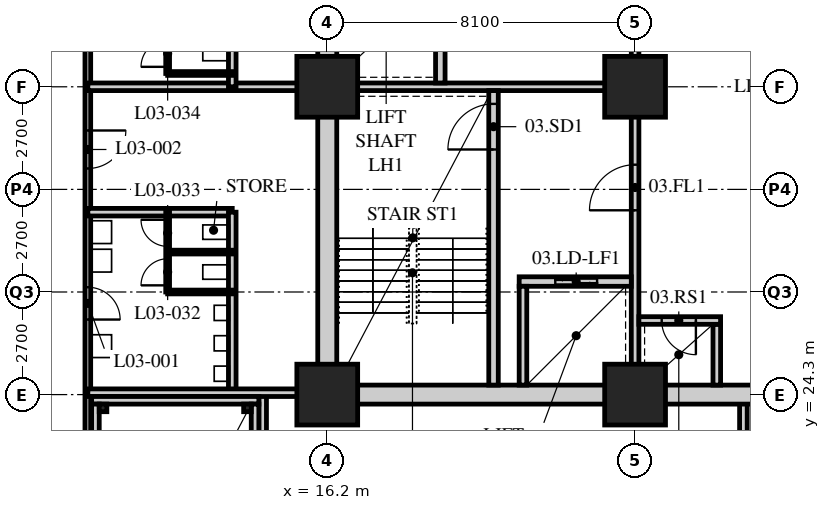
"""IFC4 building model, lengths in metres.
Left out: names, types, materials, properties, quantities, classifications, styles, units other than length and angle.
Written with IfcOpenShell. Run it as: python <this file> out.ifc"""

import sys

from ifc_helpers import new_model, si_unit, direction, frame, frame_2d, origin, origin_2d, place, context, subcontext, project, spatial, rectangle, hollow_rectangle, extrude, element, fill, save


model = new_model("IFC4")
c1 = context("Model", 3, precision=1e-05, world=origin(), true_north=direction((0.0, 1.0)))
c2 = subcontext(c1, "Body", "Model", "MODEL_VIEW")
j1 = project(units=[si_unit("LENGTHUNIT", "METRE"), si_unit("PLANEANGLEUNIT", "RADIAN")], contexts=[c1])
p1 = place(None, origin())
s1 = spatial("IfcSite", under=j1, at=p1, CompositionType="ELEMENT")
p2 = place(p1, origin())
s2 = spatial("IfcBuilding", under=s1, at=p2, CompositionType="ELEMENT")
p3 = place(p2, frame((0.0, 0.0, 16.8)))
s3 = spatial("IfcBuildingStorey", under=s2, at=p3, CompositionType="ELEMENT", Elevation=16.8)
for number, where, z_axis, x_axis in (
    (1, (16.2, 24.3, 0.0), (0.0, 0.0, 1.0), (1.0, 0.0, 0.0)),
    (2, (16.2, 32.4, 0.0), (0.0, 0.0, 1.0), (1.0, 0.0, 0.0)),
    (3, (24.3, 24.3, 0.0), (0.0, 0.0, 1.0), (1.0, 0.0, 0.0)),
    (4, (24.3, 32.4, 0.0), (0.0, 0.0, 1.0), (1.0, 0.0, 0.0)),
):
    element("IfcColumn", number, at=place(p3, frame(where, z_axis=z_axis, x_axis=x_axis)), inside=s3, PredefinedType="COLUMN", context=c2, shape_type="SweptSolid", body=[
        extrude(hollow_rectangle(XDim=1.6, YDim=1.6, WallThickness=0.15, at=origin_2d()), origin(), (0.0, 0.0, 1.0), 5.4),
    ])
p4 = place(p3, frame((9.9, 40.65, 0.0), z_axis=(0.0, 0.0, 1.0), x_axis=(0.0, -1.0, 0.0)))
e5 = element("IfcWall", 5, at=p4, inside=s3, PredefinedType="PARTITIONING", context=c2, shape_type="SweptSolid", body=[
    extrude(rectangle(XDim=30.75, YDim=0.15, at=frame_2d((15.375, 0.0))), origin(), (0.0, 0.0, 1.0), 5.15),
])
p5 = place(p4, frame((13.525, 0.0, 0.0)))
e6 = element("IfcOpeningElement", 6, at=p5, cuts=e5, PredefinedType="OPENING", context=c2, shape_type="SweptSolid", body=[
    extrude(rectangle(XDim=0.85, YDim=2.1, at=frame_2d((0.425, 1.05))), frame((0.0, 0.085, 0.0), z_axis=(0.0, -1.0, 0.0), x_axis=(1.0, 0.0, 0.0)), (0.0, 0.0, 1.0), 0.17),
])
p6 = place(p4, frame((9.4, 0.0, 0.0)))
e7 = element("IfcOpeningElement", 7, at=p6, cuts=e5, PredefinedType="OPENING", context=c2, shape_type="SweptSolid", body=[
    extrude(rectangle(XDim=1.0, YDim=2.1, at=frame_2d((0.5, 1.05))), frame((0.0, 0.085, 0.0), z_axis=(0.0, -1.0, 0.0), x_axis=(1.0, 0.0, 0.0)), (0.0, 0.0, 1.0), 0.17),
])
p7 = place(p4, frame((5.025, 0.0, 0.0)))
e8 = element("IfcOpeningElement", 8, at=p7, cuts=e5, PredefinedType="OPENING", context=c2, shape_type="SweptSolid", body=[
    extrude(rectangle(XDim=0.85, YDim=2.1, at=frame_2d((0.425, 1.05))), frame((0.0, 0.085, 0.0), z_axis=(0.0, -1.0, 0.0), x_axis=(1.0, 0.0, 0.0)), (0.0, 0.0, 1.0), 0.17),
])
p8 = place(p4, frame((0.9, 0.0, 0.0)))
e9 = element("IfcOpeningElement", 9, at=p8, cuts=e5, PredefinedType="OPENING", context=c2, shape_type="SweptSolid", body=[
    extrude(rectangle(XDim=1.0, YDim=2.1, at=frame_2d((0.5, 1.05))), frame((0.0, 0.085, 0.0), z_axis=(0.0, -1.0, 0.0), x_axis=(1.0, 0.0, 0.0)), (0.0, 0.0, 1.0), 0.17),
])
p9 = place(p3, frame((9.9, 32.4, 0.0), z_axis=(0.0, 0.0, 1.0), x_axis=(1.0, 0.0, 0.0)))
e10 = element("IfcWall", 10, at=p9, inside=s3, PredefinedType="SOLIDWALL", context=c2, shape_type="SweptSolid", body=[
    extrude(rectangle(XDim=6.3, YDim=0.2, at=frame_2d((3.15, 0.0))), origin(), (0.0, 0.0, 1.0), 4.538),
])
p10 = place(p3, frame((9.9, 29.1, 0.0), z_axis=(0.0, 0.0, 1.0), x_axis=(1.0, 0.0, 0.0)))
e11 = element("IfcWall", 11, at=p10, inside=s3, PredefinedType="SOLIDWALL", context=c2, shape_type="SweptSolid", body=[
    extrude(rectangle(XDim=3.8, YDim=0.2, at=frame_2d((1.9, 0.0))), origin(), (0.0, 0.0, 1.0), 5.15),
])
p11 = place(p3, frame((13.7, 24.3, 0.0), z_axis=(0.0, 0.0, 1.0), x_axis=(0.0, 1.0, 0.0)))
e12 = element("IfcWall", 12, at=p11, inside=s3, PredefinedType="SOLIDWALL", context=c2, shape_type="SweptSolid", body=[
    extrude(rectangle(XDim=4.8, YDim=0.2, at=frame_2d((2.4, 0.0))), origin(), (0.0, 0.0, 1.0), 5.15),
])
p12 = place(p3, frame((13.7, 32.4, 0.0), z_axis=(0.0, 0.0, 1.0), x_axis=(0.0, 1.0, 0.0)))
e13 = element("IfcWall", 13, at=p12, inside=s3, PredefinedType="SOLIDWALL", context=c2, shape_type="SweptSolid", body=[
    extrude(rectangle(XDim=5.6, YDim=0.2, at=frame_2d((2.8, 0.0))), origin(), (0.0, 0.0, 1.0), 5.15),
])
for number, where, z_axis, x_axis in (
    (14, (14.5, 9.9, 0.0), (0.0, 0.0, 1.0), (0.0, 1.0, 0.0)),
    (15, (27.15, 9.9, 0.0), (0.0, 0.0, 1.0), (0.0, 1.0, 0.0)),
):
    element("IfcWall", number, at=place(p3, frame(where, z_axis=z_axis, x_axis=x_axis)), inside=s3, PredefinedType="SOLIDWALL", context=c2, shape_type="SweptSolid", body=[
        extrude(rectangle(XDim=14.4, YDim=0.2, at=frame_2d((7.2, 0.0))), origin(), (0.0, 0.0, 1.0), 5.15),
    ])
p13 = place(p3, frame((9.9, 24.35, 0.0), z_axis=(0.0, 0.0, 1.0), x_axis=(1.0, 0.0, 0.0)))
e16 = element("IfcWall", 16, at=p13, inside=s3, PredefinedType="SOLIDWALL", context=c2, shape_type="SweptSolid", body=[
    extrude(rectangle(XDim=6.3, YDim=0.2, at=frame_2d((3.15, 0.0))), origin(), (0.0, 0.0, 1.0), 4.538),
])
p14 = place(p3, frame((12.0, 27.0, 0.0), z_axis=(0.0, 0.0, 1.0), x_axis=(0.0, 1.0, 0.0)))
e17 = element("IfcWall", 17, at=p14, inside=s3, PredefinedType="PARTITIONING", context=c2, shape_type="SweptSolid", body=[
    extrude(rectangle(XDim=2.1, YDim=0.1, at=frame_2d((1.05, 0.0))), origin(), (0.0, 0.0, 1.0), 5.15),
])
p15 = place(p14, frame((0.175, 0.0, 0.0)))
e18 = element("IfcOpeningElement", 18, at=p15, cuts=e17, PredefinedType="OPENING", context=c2, shape_type="SweptSolid", body=[
    extrude(rectangle(XDim=0.7, YDim=2.0, at=frame_2d((0.35, 1.0))), frame((0.0, 0.06, 0.0), z_axis=(0.0, -1.0, 0.0), x_axis=(1.0, 0.0, 0.0)), (0.0, 0.0, 1.0), 0.12),
])
p16 = place(p14, frame((1.2, 0.0, 0.0)))
e19 = element("IfcOpeningElement", 19, at=p16, cuts=e17, PredefinedType="OPENING", context=c2, shape_type="SweptSolid", body=[
    extrude(rectangle(XDim=0.7, YDim=2.0, at=frame_2d((0.35, 1.0))), frame((0.0, 0.06, 0.0), z_axis=(0.0, -1.0, 0.0), x_axis=(1.0, 0.0, 0.0)), (0.0, 0.0, 1.0), 0.12),
])
for number, where, z_axis, x_axis in (
    (20, (12.0, 27.0, 0.0), (0.0, 0.0, 1.0), (1.0, 0.0, 0.0)),
    (21, (12.0, 28.05, 0.0), (0.0, 0.0, 1.0), (1.0, 0.0, 0.0)),
):
    element("IfcWall", number, at=place(p3, frame(where, z_axis=z_axis, x_axis=x_axis)), inside=s3, PredefinedType="PARTITIONING", context=c2, shape_type="SweptSolid", body=[
        extrude(rectangle(XDim=1.7, YDim=0.1, at=frame_2d((0.85, 0.0))), origin(), (0.0, 0.0, 1.0), 5.15),
    ])
p17 = place(p3, frame((12.0, 32.75, 0.0), z_axis=(0.0, 0.0, 1.0), x_axis=(0.0, 1.0, 0.0)))
e22 = element("IfcWall", 22, at=p17, inside=s3, PredefinedType="PARTITIONING", context=c2, shape_type="SweptSolid", body=[
    extrude(rectangle(XDim=5.25, YDim=0.1, at=frame_2d((2.625, 0.0))), origin(), (0.0, 0.0, 1.0), 5.15),
])
p18 = place(p17, frame((0.175, 0.0, 0.0)))
e23 = element("IfcOpeningElement", 23, at=p18, cuts=e22, PredefinedType="OPENING", context=c2, shape_type="SweptSolid", body=[
    extrude(rectangle(XDim=0.7, YDim=2.0, at=frame_2d((0.35, 1.0))), frame((0.0, 0.06, 0.0), z_axis=(0.0, -1.0, 0.0), x_axis=(1.0, 0.0, 0.0)), (0.0, 0.0, 1.0), 0.12),
])
p19 = place(p17, frame((1.225, 0.0, 0.0)))
e24 = element("IfcOpeningElement", 24, at=p19, cuts=e22, PredefinedType="OPENING", context=c2, shape_type="SweptSolid", body=[
    extrude(rectangle(XDim=0.7, YDim=2.0, at=frame_2d((0.35, 1.0))), frame((0.0, 0.06, 0.0), z_axis=(0.0, -1.0, 0.0), x_axis=(1.0, 0.0, 0.0)), (0.0, 0.0, 1.0), 0.12),
])
p20 = place(p17, frame((2.275, 0.0, 0.0)))
e25 = element("IfcOpeningElement", 25, at=p20, cuts=e22, PredefinedType="OPENING", context=c2, shape_type="SweptSolid", body=[
    extrude(rectangle(XDim=0.7, YDim=2.0, at=frame_2d((0.35, 1.0))), frame((0.0, 0.06, 0.0), z_axis=(0.0, -1.0, 0.0), x_axis=(1.0, 0.0, 0.0)), (0.0, 0.0, 1.0), 0.12),
])
p21 = place(p17, frame((3.325, 0.0, 0.0)))
e26 = element("IfcOpeningElement", 26, at=p21, cuts=e22, PredefinedType="OPENING", context=c2, shape_type="SweptSolid", body=[
    extrude(rectangle(XDim=0.7, YDim=2.0, at=frame_2d((0.35, 1.0))), frame((0.0, 0.06, 0.0), z_axis=(0.0, -1.0, 0.0), x_axis=(1.0, 0.0, 0.0)), (0.0, 0.0, 1.0), 0.12),
])
p22 = place(p17, frame((4.35, 0.0, 0.0)))
e27 = element("IfcOpeningElement", 27, at=p22, cuts=e22, PredefinedType="OPENING", context=c2, shape_type="SweptSolid", body=[
    extrude(rectangle(XDim=0.7, YDim=2.0, at=frame_2d((0.35, 1.0))), frame((0.0, 0.06, 0.0), z_axis=(0.0, -1.0, 0.0), x_axis=(1.0, 0.0, 0.0)), (0.0, 0.0, 1.0), 0.12),
])
p23 = place(p3, frame((12.0, 32.75, 0.0), z_axis=(0.0, 0.0, 1.0), x_axis=(1.0, 0.0, 0.0)))
e28 = element("IfcWall", 28, at=p23, inside=s3, PredefinedType="PARTITIONING", context=c2, shape_type="SweptSolid", body=[
    extrude(rectangle(XDim=1.7, YDim=0.1, at=frame_2d((0.85, 0.0))), origin(), (0.0, 0.0, 1.0), 5.15),
])
p24 = place(p3, frame((15.95, 24.3, 0.0), z_axis=(0.0, 0.0, 1.0), x_axis=(1.0, 0.0, 0.0)))
e29 = element("IfcWall", 29, at=p24, inside=s3, PredefinedType="SOLIDWALL", context=c2, shape_type="SweptSolid", body=[
    extrude(rectangle(XDim=24.8, YDim=0.5, at=frame_2d((12.4, 0.0))), origin(), (0.0, 0.0, 1.0), 4.5),
])
p25 = place(p24, frame((11.5, 0.0, 0.0)))
e30 = element("IfcOpeningElement", 30, at=p25, cuts=e29, PredefinedType="OPENING", context=c2, shape_type="SweptSolid", body=[
    extrude(rectangle(XDim=1.8, YDim=2.4, at=frame_2d((0.9, 1.2))), frame((0.0, 0.26, 0.0), z_axis=(0.0, -1.0, 0.0), x_axis=(1.0, 0.0, 0.0)), (0.0, 0.0, 1.0), 0.52),
])
p26 = place(p3, frame((16.2, 24.55, 0.0), z_axis=(0.0, 0.0, 1.0), x_axis=(0.0, 1.0, 0.0)))
e31 = element("IfcWall", 31, at=p26, inside=s3, PredefinedType="SOLIDWALL", context=c2, shape_type="SweptSolid", body=[
    extrude(rectangle(XDim=15.7, YDim=0.5, at=frame_2d((7.85, 0.0))), origin(), (0.0, 0.0, 1.0), 4.538),
])
p27 = place(p3, frame((16.45, 32.4, 0.0), z_axis=(0.0, 0.0, 1.0), x_axis=(1.0, 0.0, 0.0)))
e32 = element("IfcWall", 32, at=p27, inside=s3, PredefinedType="SOLIDWALL", context=c2, shape_type="SweptSolid", body=[
    extrude(rectangle(XDim=7.95, YDim=0.2, at=frame_2d((3.975, 0.0))), origin(), (0.0, 0.0, 1.0), 4.45),
])
p28 = place(p3, frame((24.3, 24.55, 0.0), z_axis=(0.0, 0.0, 1.0), x_axis=(0.0, 1.0, 0.0)))
e33 = element("IfcWall", 33, at=p28, inside=s3, PredefinedType="SOLIDWALL", context=c2, shape_type="SweptSolid", body=[
    extrude(rectangle(XDim=7.75, YDim=0.2, at=frame_2d((3.875, 0.0))), origin(), (0.0, 0.0, 1.0), 4.45),
])
p29 = place(p28, frame((4.6, 0.0, 0.0)))
e34 = element("IfcOpeningElement", 34, at=p29, cuts=e33, PredefinedType="OPENING", context=c2, shape_type="SweptSolid", body=[
    extrude(rectangle(XDim=1.2, YDim=2.1, at=frame_2d((0.6, 1.05))), frame((0.0, 0.11, 0.0), z_axis=(0.0, -1.0, 0.0), x_axis=(1.0, 0.0, 0.0)), (0.0, 0.0, 1.0), 0.22),
])
p30 = place(p3, frame((20.575, 24.55, 0.0), z_axis=(0.0, 0.0, 1.0), x_axis=(0.0, 1.0, 0.0)))
e35 = element("IfcWall", 35, at=p30, inside=s3, PredefinedType="SOLIDWALL", context=c2, shape_type="SweptSolid", body=[
    extrude(rectangle(XDim=7.75, YDim=0.25, at=frame_2d((3.875, 0.0))), origin(), (0.0, 0.0, 1.0), 5.15),
])
p31 = place(p30, frame((6.2, 0.0, 0.0)))
e36 = element("IfcOpeningElement", 36, at=p31, cuts=e35, PredefinedType="OPENING", context=c2, shape_type="SweptSolid", body=[
    extrude(rectangle(XDim=1.2, YDim=2.1, at=frame_2d((0.6, 1.05))), frame((0.0, 0.135, 0.0), z_axis=(0.0, -1.0, 0.0), x_axis=(1.0, 0.0, 0.0)), (0.0, 0.0, 1.0), 0.27),
])
p32 = place(p3, frame((21.25, 27.275, 0.0), z_axis=(0.0, 0.0, 1.0), x_axis=(1.0, 0.0, 0.0)))
e37 = element("IfcWall", 37, at=p32, inside=s3, PredefinedType="SOLIDWALL", context=c2, shape_type="SweptSolid", body=[
    extrude(rectangle(XDim=2.95, YDim=0.25, at=frame_2d((1.475, 0.0))), origin(), (0.0, 0.0, 1.0), 5.15),
])
p33 = place(p32, frame((0.95, 0.0, 0.0)))
e38 = element("IfcOpeningElement", 38, at=p33, cuts=e37, PredefinedType="OPENING", context=c2, shape_type="SweptSolid", body=[
    extrude(rectangle(XDim=1.1, YDim=2.4, at=frame_2d((0.55, 1.2))), frame((0.0, 0.135, 0.0), z_axis=(0.0, -1.0, 0.0), x_axis=(1.0, 0.0, 0.0)), (0.0, 0.0, 1.0), 0.27),
])
p34 = place(p3, frame((21.35, 24.55, 0.0), z_axis=(0.0, 0.0, 1.0), x_axis=(0.0, 1.0, 0.0)))
e39 = element("IfcWall", 39, at=p34, inside=s3, PredefinedType="SOLIDWALL", context=c2, shape_type="SweptSolid", body=[
    extrude(rectangle(XDim=2.6, YDim=0.2, at=frame_2d((1.3, 0.0))), origin(), (0.0, 0.0, 1.0), 5.15),
])
p35 = place(p3, frame((19.175, 32.5, 0.0), z_axis=(0.0, 0.0, 1.0), x_axis=(0.0, 1.0, 0.0)))
e40 = element("IfcWall", 40, at=p35, inside=s3, PredefinedType="SOLIDWALL", context=c2, shape_type="SweptSolid", body=[
    extrude(rectangle(XDim=7.75, YDim=0.25, at=frame_2d((3.875, 0.0))), origin(), (0.0, 0.0, 1.0), 5.15),
])
p36 = place(p3, frame((26.45, 24.55, 0.0), z_axis=(0.0, 0.0, 1.0), x_axis=(0.0, 1.0, 0.0)))
e41 = element("IfcWall", 41, at=p36, inside=s3, PredefinedType="SOLIDWALL", context=c2, shape_type="SweptSolid", body=[
    extrude(rectangle(XDim=1.6, YDim=0.2, at=frame_2d((0.8, 0.0))), origin(), (0.0, 0.0, 1.0), 5.15),
])
p37 = place(p3, frame((24.4, 26.25, 0.0), z_axis=(0.0, 0.0, 1.0), x_axis=(1.0, 0.0, 0.0)))
e42 = element("IfcWall", 42, at=p37, inside=s3, PredefinedType="SOLIDWALL", context=c2, shape_type="SweptSolid", body=[
    extrude(rectangle(XDim=2.15, YDim=0.2, at=frame_2d((1.075, 0.0))), origin(), (0.0, 0.0, 1.0), 5.15),
])
p38 = place(p37, frame((0.6, 0.0, 0.0)))
e43 = element("IfcOpeningElement", 43, at=p38, cuts=e42, PredefinedType="OPENING", context=c2, shape_type="SweptSolid", body=[
    extrude(rectangle(XDim=0.9, YDim=2.1, at=frame_2d((0.45, 1.05))), frame((0.0, 0.11, 0.0), z_axis=(0.0, -1.0, 0.0), x_axis=(1.0, 0.0, 0.0)), (0.0, 0.0, 1.0), 0.22),
])
p39 = place(p3, frame((24.3, 32.5, 0.0), z_axis=(0.0, 0.0, 1.0), x_axis=(0.0, 1.0, 0.0)))
e44 = element("IfcWall", 44, at=p39, inside=s3, PredefinedType="PARTITIONING", context=c2, shape_type="SweptSolid", body=[
    extrude(rectangle(XDim=7.75, YDim=0.2, at=frame_2d((3.875, 0.0))), origin(), (0.0, 0.0, 1.0), 4.45),
])
p40 = place(p39, frame((1.0, 0.0, 0.0)))
e45 = element("IfcOpeningElement", 45, at=p40, cuts=e44, PredefinedType="OPENING", context=c2, shape_type="SweptSolid", body=[
    extrude(rectangle(XDim=1.0, YDim=2.1, at=frame_2d((0.5, 1.05))), frame((0.0, 0.11, 0.0), z_axis=(0.0, -1.0, 0.0), x_axis=(1.0, 0.0, 0.0)), (0.0, 0.0, 1.0), 0.22),
])
p41 = place(p39, frame((5.0, 0.0, 0.0)))
e46 = element("IfcOpeningElement", 46, at=p41, cuts=e44, PredefinedType="OPENING", context=c2, shape_type="SweptSolid", body=[
    extrude(rectangle(XDim=0.9, YDim=2.1, at=frame_2d((0.45, 1.05))), frame((0.0, 0.11, 0.0), z_axis=(0.0, -1.0, 0.0), x_axis=(1.0, 0.0, 0.0)), (0.0, 0.0, 1.0), 0.22),
])
p42 = place(p3, frame((10.0, 24.15, 0.0), z_axis=(0.0, 0.0, 1.0), x_axis=(1.0, 0.0, 0.0)))
e47 = element("IfcWall", 47, at=p42, inside=s3, PredefinedType="SOLIDWALL", context=c2, shape_type="SweptSolid", body=[
    extrude(rectangle(XDim=4.4, YDim=0.2, at=frame_2d((2.2, 0.0))), origin(), (0.0, 0.0, 1.0), 4.538),
])
for number, where, z_axis, x_axis in (
    (48, (10.1, 16.45, 0.0), (0.0, 0.0, 1.0), (0.0, 1.0, 0.0)),
    (49, (14.3, 16.45, 0.0), (0.0, 0.0, 1.0), (0.0, 1.0, 0.0)),
):
    element("IfcWall", number, at=place(p3, frame(where, z_axis=z_axis, x_axis=x_axis)), inside=s3, PredefinedType="SOLIDWALL", context=c2, shape_type="SweptSolid", body=[
        extrude(rectangle(XDim=7.6, YDim=0.2, at=frame_2d((3.8, 0.0))), origin(), (0.0, 0.0, 1.0), 5.15),
    ])
for number, where, z_axis, x_axis in (
    (50, (10.3, 23.95, 0.0), (0.0, 0.0, 1.0), (1.0, 0.0, 0.0)),
    (51, (14.1, 23.95, 0.0), (0.0, 0.0, 1.0), (1.0, 0.0, 0.0)),
):
    element("IfcColumn", number, at=place(p3, frame(where, z_axis=z_axis, x_axis=x_axis)), inside=s3, PredefinedType="COLUMN", context=c2, shape_type="SweptSolid", body=[
        extrude(hollow_rectangle(XDim=0.2, YDim=0.2, WallThickness=0.012, at=origin_2d()), origin(), (0.0, 0.0, 1.0), 5.4),
    ])
p43 = place(p5, origin())
e52 = element("IfcDoor", 52, at=p43, inside=s3, OperationType="SINGLE_SWING_RIGHT", PredefinedType="DOOR", context=c2, shape_type="SweptSolid", body=[
    extrude(rectangle(XDim=0.85, YDim=2.1, at=frame_2d((0.425, 1.05))), frame((0.0, 0.025, 0.0), z_axis=(0.0, -1.0, 0.0), x_axis=(1.0, 0.0, 0.0)), (0.0, 0.0, 1.0), 0.05),
])
fill(e6, e52)
p44 = place(p6, origin())
e53 = element("IfcDoor", 53, at=p44, inside=s3, OperationType="SINGLE_SWING_LEFT", PredefinedType="DOOR", context=c2, shape_type="SweptSolid", body=[
    extrude(rectangle(XDim=1.0, YDim=2.1, at=frame_2d((0.5, 1.05))), frame((0.0, 0.025, 0.0), z_axis=(0.0, -1.0, 0.0), x_axis=(1.0, 0.0, 0.0)), (0.0, 0.0, 1.0), 0.05),
])
fill(e7, e53)
p45 = place(p15, origin())
e54 = element("IfcDoor", 54, at=p45, inside=s3, OperationType="SINGLE_SWING_LEFT", PredefinedType="DOOR", context=c2, shape_type="SweptSolid", body=[
    extrude(rectangle(XDim=0.7, YDim=2.0, at=frame_2d((0.35, 1.0))), frame((0.0, 0.025, 0.0), z_axis=(0.0, -1.0, 0.0), x_axis=(1.0, 0.0, 0.0)), (0.0, 0.0, 1.0), 0.05),
])
fill(e18, e54)
p46 = place(p16, origin())
e55 = element("IfcDoor", 55, at=p46, inside=s3, OperationType="SINGLE_SWING_RIGHT", PredefinedType="DOOR", context=c2, shape_type="SweptSolid", body=[
    extrude(rectangle(XDim=0.7, YDim=2.0, at=frame_2d((0.35, 1.0))), frame((0.0, 0.025, 0.0), z_axis=(0.0, -1.0, 0.0), x_axis=(1.0, 0.0, 0.0)), (0.0, 0.0, 1.0), 0.05),
])
fill(e19, e55)
p47 = place(p18, origin())
e56 = element("IfcDoor", 56, at=p47, inside=s3, OperationType="SINGLE_SWING_LEFT", PredefinedType="DOOR", context=c2, shape_type="SweptSolid", body=[
    extrude(rectangle(XDim=0.7, YDim=2.0, at=frame_2d((0.35, 1.0))), frame((0.0, 0.025, 0.0), z_axis=(0.0, -1.0, 0.0), x_axis=(1.0, 0.0, 0.0)), (0.0, 0.0, 1.0), 0.05),
])
fill(e23, e56)
p48 = place(p31, origin())
e57 = element("IfcDoor", 57, at=p48, inside=s3, OperationType="SINGLE_SWING_LEFT", PredefinedType="DOOR", context=c2, shape_type="SweptSolid", body=[
    extrude(rectangle(XDim=1.2, YDim=2.1, at=frame_2d((0.6, 1.05))), frame((0.0, 0.025, 0.0), z_axis=(0.0, -1.0, 0.0), x_axis=(1.0, 0.0, 0.0)), (0.0, 0.0, 1.0), 0.05),
])
fill(e36, e57)
p49 = place(p29, origin())
e58 = element("IfcDoor", 58, at=p49, inside=s3, OperationType="SINGLE_SWING_LEFT", PredefinedType="DOOR", context=c2, shape_type="SweptSolid", body=[
    extrude(rectangle(XDim=1.2, YDim=2.1, at=frame_2d((0.6, 1.05))), frame((0.0, 0.025, 0.0), z_axis=(0.0, -1.0, 0.0), x_axis=(1.0, 0.0, 0.0)), (0.0, 0.0, 1.0), 0.05),
])
fill(e34, e58)
p50 = place(p38, origin())
e59 = element("IfcDoor", 59, at=p50, inside=s3, OperationType="SINGLE_SWING_LEFT", PredefinedType="DOOR", context=c2, shape_type="SweptSolid", body=[
    extrude(rectangle(XDim=0.9, YDim=2.1, at=frame_2d((0.45, 1.05))), frame((0.0, 0.025, 0.0), z_axis=(0.0, -1.0, 0.0), x_axis=(1.0, 0.0, 0.0)), (0.0, 0.0, 1.0), 0.05),
])
fill(e43, e59)
p51 = place(p33, origin())
e60 = element("IfcDoor", 60, at=p51, inside=s3, OperationType="DOUBLE_DOOR_SLIDING", PredefinedType="DOOR", context=c2, shape_type="SweptSolid", body=[
    extrude(rectangle(XDim=1.1, YDim=2.4, at=frame_2d((0.55, 1.2))), frame((0.0, 0.025, 0.0), z_axis=(0.0, -1.0, 0.0), x_axis=(1.0, 0.0, 0.0)), (0.0, 0.0, 1.0), 0.05),
])
fill(e38, e60)
save(model, sys.argv[1])
